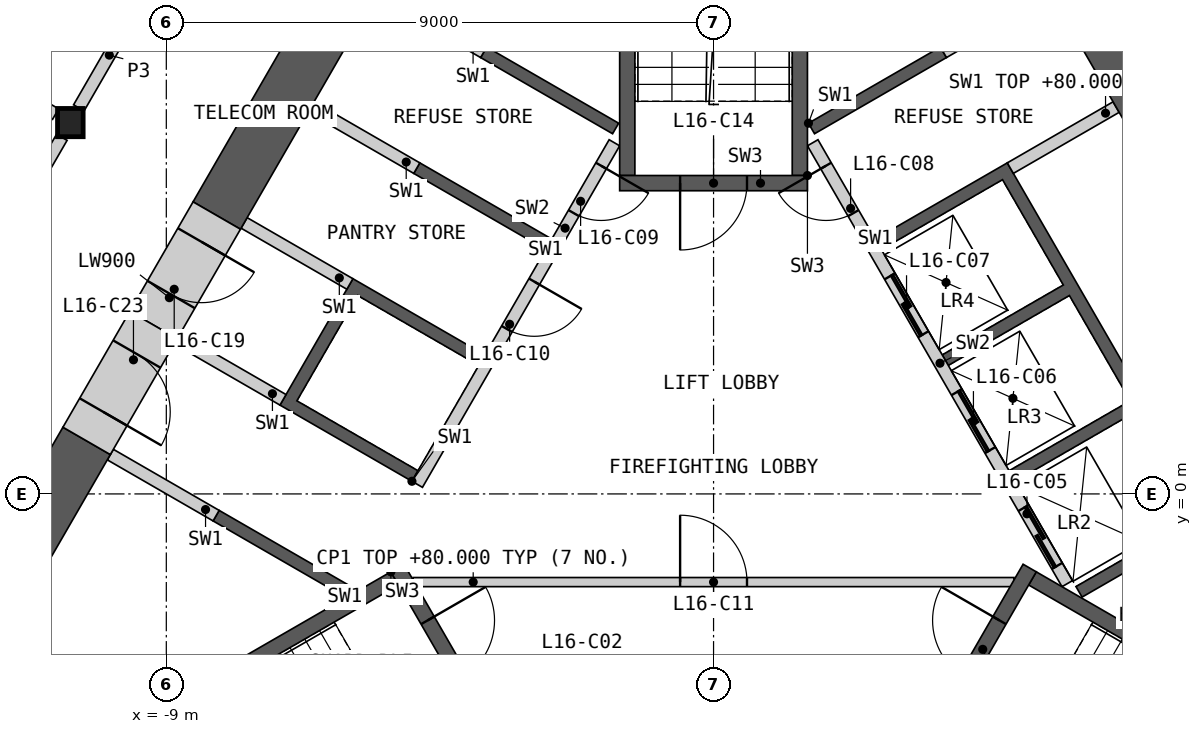
"""IFC4 building model, lengths in metres.
Left out: names, types, materials, properties, quantities, classifications, styles, units other than length and angle.
Written with IfcOpenShell. Run it as: python <this file> out.ifc"""

import sys

from ifc_helpers import new_model, si_unit, direction, frame, frame_2d, origin, origin_2d, place, context, subcontext, project, spatial, polyline, rectangle, i_section, outline, extrude, element, fill, save


model = new_model("IFC4")
c1 = context("Model", 3, precision=1e-05, world=origin(), true_north=direction((0.0, 1.0)))
c2 = subcontext(c1, "Body", "Model", "MODEL_VIEW")
j1 = project(units=[si_unit("LENGTHUNIT", "METRE"), si_unit("PLANEANGLEUNIT", "RADIAN")], contexts=[c1])
p1 = place(None, origin())
s1 = spatial("IfcSite", under=j1, at=p1, CompositionType="ELEMENT")
p2 = place(p1, origin())
s2 = spatial("IfcBuilding", under=s1, at=p2, CompositionType="ELEMENT")
p3 = place(p2, frame((0.0, 0.0, 76.2)))
s3 = spatial("IfcBuildingStorey", under=s2, at=p3, CompositionType="ELEMENT", Elevation=76.2)
p4 = place(p3, frame((-10.578, 6.107, 0.0), z_axis=(0.0, 0.0, 1.0), x_axis=(1.0, 0.0, 0.0)))
e1 = element("IfcColumn", 1, at=p4, inside=s3, PredefinedType="COLUMN", context=c2, shape_type="SweptSolid", body=[
    extrude(i_section(OverallWidth=0.421, OverallDepth=0.465, WebThickness=0.045, FlangeThickness=0.072, at=origin_2d()), origin(), (0.0, 0.0, 1.0), 4.2),
])
p5 = place(p3, origin())
e2 = element("IfcWall", 2, at=p5, inside=s3, PredefinedType="SHEAR", context=c2, shape_type="SweptSolid", body=[
    extrude(outline(polyline([(1.561, 6.097), (3.731, 7.35), (3.831, 7.177), (1.66, 5.924), (1.561, 6.097)])), origin(), (0.0, 0.0, 1.0), 3.8),
])
p6 = place(p3, origin())
e3 = element("IfcWall", 3, at=p6, inside=s3, PredefinedType="SHEAR", context=c2, shape_type="SweptSolid", body=[
    extrude(outline(polyline([(2.66, 4.192), (4.831, 5.445), (8.231, -0.444), (6.061, -1.697), (5.96, -1.524), (7.952, -0.374), (6.952, 1.358), (4.96, 0.208), (4.861, 0.381), (6.852, 1.531), (5.852, 3.263), (3.861, 2.113), (3.76, 2.287), (5.752, 3.437), (4.752, 5.169), (2.76, 4.019), (2.66, 4.192)])), origin(), (0.0, 0.0, 1.0), 3.8),
])
p7 = place(p3, frame((5.817, -1.476, 0.0), z_axis=(0.0, 0.0, 1.0), x_axis=(-0.500002616675, 0.866023893041, 0.0)))
e4 = element("IfcWall", 4, at=p7, inside=s3, PredefinedType="SOLIDWALL", context=c2, shape_type="SweptSolid", body=[
    extrude(rectangle(XDim=8.373, YDim=0.2, at=frame_2d((4.187, 0.0))), origin(), (0.0, 0.0, 1.0), 3.8),
])
p8 = place(p7, frame((0.337, 0.0, 0.0)))
e5 = element("IfcOpeningElement", 5, at=p8, cuts=e4, PredefinedType="OPENING", context=c2, shape_type="SweptSolid", body=[
    extrude(rectangle(XDim=1.1, YDim=2.1, at=frame_2d((0.55, 1.05))), frame((0.0, 0.11, 0.0), z_axis=(0.0, -1.0, 0.0), x_axis=(1.0, 0.0, 0.0)), (0.0, 0.0, 1.0), 0.22),
])
p9 = place(p7, frame((2.537, 0.0, 0.0)))
e6 = element("IfcOpeningElement", 6, at=p9, cuts=e4, PredefinedType="OPENING", context=c2, shape_type="SweptSolid", body=[
    extrude(rectangle(XDim=1.1, YDim=2.1, at=frame_2d((0.55, 1.05))), frame((0.0, 0.11, 0.0), z_axis=(0.0, -1.0, 0.0), x_axis=(1.0, 0.0, 0.0)), (0.0, 0.0, 1.0), 0.22),
])
p10 = place(p7, frame((4.737, 0.0, 0.0)))
e7 = element("IfcOpeningElement", 7, at=p10, cuts=e4, PredefinedType="OPENING", context=c2, shape_type="SweptSolid", body=[
    extrude(rectangle(XDim=1.1, YDim=2.1, at=frame_2d((0.55, 1.05))), frame((0.0, 0.11, 0.0), z_axis=(0.0, -1.0, 0.0), x_axis=(1.0, 0.0, 0.0)), (0.0, 0.0, 1.0), 0.22),
])
p11 = place(p7, frame((7.037, 0.0, 0.0)))
e8 = element("IfcOpeningElement", 8, at=p11, cuts=e4, PredefinedType="OPENING", context=c2, shape_type="SweptSolid", body=[
    extrude(rectangle(XDim=0.9, YDim=2.1, at=frame_2d((0.45, 1.05))), frame((0.0, 0.11, 0.0), z_axis=(0.0, -1.0, 0.0), x_axis=(1.0, 0.0, 0.0)), (0.0, 0.0, 1.0), 0.22),
])
p12 = place(p3, frame((4.881, 5.358, 0.0), z_axis=(0.0, 0.0, 1.0), x_axis=(0.866035824272, 0.499981950752, 0.0)))
e9 = element("IfcWall", 9, at=p12, inside=s3, PredefinedType="SHEAR", context=c2, shape_type="SweptSolid", body=[
    extrude(rectangle(XDim=2.009, YDim=0.2, at=frame_2d((1.004, 0.0))), origin(), (0.0, 0.0, 1.0), 3.8),
])
p13 = place(p3, frame((3.781, 7.263, 0.0), z_axis=(0.0, 0.0, 1.0), x_axis=(0.865983199114, 0.50007309351, 0.0)))
e10 = element("IfcWall", 10, at=p13, inside=s3, PredefinedType="SHEAR", context=c2, shape_type="SweptSolid", body=[
    extrude(rectangle(XDim=2.009, YDim=0.2, at=frame_2d((1.004, 0.0))), origin(), (0.0, 0.0, 1.0), 3.8),
])
p14 = place(p3, origin())
e11 = element("IfcWall", 11, at=p14, inside=s3, PredefinedType="SHEAR", context=c2, shape_type="SweptSolid", body=[
    extrude(outline(polyline([(-6.061, -1.697), (-8.231, -0.444), (-8.131, -0.271), (-5.96, -1.524), (-6.061, -1.697)])), origin(), (0.0, 0.0, 1.0), 3.8),
])
p15 = place(p3, origin())
e12 = element("IfcWall", 12, at=p15, inside=s3, PredefinedType="SHEAR", context=c2, shape_type="SweptSolid", body=[
    extrude(outline(polyline([(-4.96, 0.208), (-7.131, 1.461), (-5.931, 3.54), (-3.76, 2.287), (-3.861, 2.113), (-5.852, 3.263), (-6.852, 1.531), (-4.861, 0.381), (-4.96, 0.208)])), origin(), (0.0, 0.0, 1.0), 3.8),
])
p16 = place(p3, origin())
e13 = element("IfcWall", 13, at=p16, inside=s3, PredefinedType="SHEAR", context=c2, shape_type="SweptSolid", body=[
    extrude(outline(polyline([(-2.76, 4.019), (-4.931, 5.272), (-4.831, 5.445), (-2.66, 4.192), (-2.76, 4.019)])), origin(), (0.0, 0.0, 1.0), 3.8),
])
p17 = place(p3, origin())
e14 = element("IfcWall", 14, at=p17, inside=s3, PredefinedType="SHEAR", context=c2, shape_type="SweptSolid", body=[
    extrude(outline(polyline([(-3.731, 7.35), (-1.561, 6.097), (-1.66, 5.924), (-3.831, 7.177), (-3.731, 7.35)])), origin(), (0.0, 0.0, 1.0), 3.8),
])
p18 = place(p3, frame((-1.631, 5.776, 0.0), z_axis=(0.0, 0.0, 1.0), x_axis=(-0.499992876559, -0.866029516466, 0.0)))
e15 = element("IfcWall", 15, at=p18, inside=s3, PredefinedType="SOLIDWALL", context=c2, shape_type="SweptSolid", body=[
    extrude(rectangle(XDim=6.486, YDim=0.2, at=frame_2d((3.243, 0.0))), origin(), (0.0, 0.0, 1.0), 3.8),
])
p19 = place(p18, frame((0.437, 0.0, 0.0)))
e16 = element("IfcOpeningElement", 16, at=p19, cuts=e15, PredefinedType="OPENING", context=c2, shape_type="SweptSolid", body=[
    extrude(rectangle(XDim=0.9, YDim=2.1, at=frame_2d((0.45, 1.05))), frame((0.0, 0.11, 0.0), z_axis=(0.0, -1.0, 0.0), x_axis=(1.0, 0.0, 0.0)), (0.0, 0.0, 1.0), 0.22),
])
p20 = place(p18, frame((2.637, 0.0, 0.0)))
e17 = element("IfcOpeningElement", 17, at=p20, cuts=e15, PredefinedType="OPENING", context=c2, shape_type="SweptSolid", body=[
    extrude(rectangle(XDim=0.9, YDim=2.1, at=frame_2d((0.45, 1.05))), frame((0.0, 0.11, 0.0), z_axis=(0.0, -1.0, 0.0), x_axis=(1.0, 0.0, 0.0)), (0.0, 0.0, 1.0), 0.22),
])
p21 = place(p3, frame((-3.781, 7.263, 0.0), z_axis=(0.0, 0.0, 1.0), x_axis=(-0.865983199114, 0.50007309351, 0.0)))
e18 = element("IfcWall", 18, at=p21, inside=s3, PredefinedType="SHEAR", context=c2, shape_type="SweptSolid", body=[
    extrude(rectangle(XDim=2.009, YDim=0.2, at=frame_2d((1.004, 0.0))), origin(), (0.0, 0.0, 1.0), 3.8),
])
p22 = place(p3, frame((-4.881, 5.358, 0.0), z_axis=(0.0, 0.0, 1.0), x_axis=(-0.866035824272, 0.499981950752, 0.0)))
e19 = element("IfcWall", 19, at=p22, inside=s3, PredefinedType="SHEAR", context=c2, shape_type="SweptSolid", body=[
    extrude(rectangle(XDim=2.009, YDim=0.2, at=frame_2d((1.004, 0.0))), origin(), (0.0, 0.0, 1.0), 3.8),
])
p23 = place(p3, frame((-5.981, 3.453, 0.0), z_axis=(0.0, 0.0, 1.0), x_axis=(-0.866013584312, 0.500020471368, 0.0)))
e20 = element("IfcWall", 20, at=p23, inside=s3, PredefinedType="SHEAR", context=c2, shape_type="SweptSolid", body=[
    extrude(rectangle(XDim=2.009, YDim=0.2, at=frame_2d((1.005, 0.0))), origin(), (0.0, 0.0, 1.0), 3.8),
])
p24 = place(p3, frame((-7.081, 1.548, 0.0), z_axis=(0.0, 0.0, 1.0), x_axis=(-0.865983199114, 0.50007309351, 0.0)))
e21 = element("IfcWall", 21, at=p24, inside=s3, PredefinedType="SHEAR", context=c2, shape_type="SweptSolid", body=[
    extrude(rectangle(XDim=2.009, YDim=0.2, at=frame_2d((1.004, 0.0))), origin(), (0.0, 0.0, 1.0), 3.8),
])
p25 = place(p3, frame((-8.181, -0.357, 0.0), z_axis=(0.0, 0.0, 1.0), x_axis=(-0.866035824272, 0.499981950752, 0.0)))
e22 = element("IfcWall", 22, at=p25, inside=s3, PredefinedType="SHEAR", context=c2, shape_type="SweptSolid", body=[
    extrude(rectangle(XDim=2.009, YDim=0.2, at=frame_2d((1.004, 0.0))), origin(), (0.0, 0.0, 1.0), 3.8),
])
p26 = place(p3, frame((-4.941, -1.45, 0.0), z_axis=(0.0, 0.0, 1.0), x_axis=(1.0, 0.0, 0.0)))
e23 = element("IfcWall", 23, at=p26, inside=s3, PredefinedType="PARTITIONING", context=c2, shape_type="SweptSolid", body=[
    extrude(rectangle(XDim=9.882, YDim=0.15, at=frame_2d((4.941, 0.0))), origin(), (0.0, 0.0, 1.0), 3.8),
])
p27 = place(p26, frame((4.391, 0.0, 0.0)))
e24 = element("IfcOpeningElement", 24, at=p27, cuts=e23, PredefinedType="OPENING", context=c2, shape_type="SweptSolid", body=[
    extrude(rectangle(XDim=1.1, YDim=2.1, at=frame_2d((0.55, 1.05))), frame((0.0, 0.085, 0.0), z_axis=(0.0, -1.0, 0.0), x_axis=(1.0, 0.0, 0.0)), (0.0, 0.0, 1.0), 0.17),
])
p28 = place(p3, origin())
e25 = element("IfcWall", 25, at=p28, inside=s3, PredefinedType="SHEAR", context=c2, shape_type="SweptSolid", body=[
    extrude(outline(polyline([(-5.307, -1.281), (-10.374, -4.206), (-10.032, -4.298), (-5.182, -1.498), (-5.307, -1.281)])), origin(), (0.0, 0.0, 1.0), 3.8),
])
p29 = place(p3, frame((-5.199, -1.219, 0.0), z_axis=(0.0, 0.0, 1.0), x_axis=(0.499982516597, -0.866035497597, 0.0)))
e26 = element("IfcWall", 26, at=p29, inside=s3, PredefinedType="SHEAR", context=c2, shape_type="SweptSolid", body=[
    extrude(rectangle(XDim=3.088, YDim=0.25, at=frame_2d((1.544, 0.0))), origin(), (0.0, 0.0, 1.0), 3.8),
])
p30 = place(p29, frame((0.994, 0.0, 0.0)))
e27 = element("IfcOpeningElement", 27, at=p30, cuts=e26, PredefinedType="OPENING", context=c2, shape_type="SweptSolid", body=[
    extrude(rectangle(XDim=1.1, YDim=2.1, at=frame_2d((0.55, 1.05))), frame((0.0, 0.135, 0.0), z_axis=(0.0, -1.0, 0.0), x_axis=(1.0, 0.0, 0.0)), (0.0, 0.0, 1.0), 0.27),
])
p31 = place(p3, origin())
e28 = element("IfcWall", 28, at=p31, inside=s3, PredefinedType="SHEAR", context=c2, shape_type="SweptSolid", body=[
    extrude(outline(polyline([(10.032, -4.298), (10.374, -4.206), (5.307, -1.281), (5.182, -1.498), (10.032, -4.298)])), origin(), (0.0, 0.0, 1.0), 3.8),
])
p32 = place(p3, frame((3.655, -3.893, 0.0), z_axis=(0.0, 0.0, 1.0), x_axis=(0.499982516597, 0.866035497597, 0.0)))
e29 = element("IfcWall", 29, at=p32, inside=s3, PredefinedType="SHEAR", context=c2, shape_type="SweptSolid", body=[
    extrude(rectangle(XDim=3.088, YDim=0.25, at=frame_2d((1.544, 0.0))), origin(), (0.0, 0.0, 1.0), 3.8),
])
p33 = place(p32, frame((0.994, 0.0, 0.0)))
e30 = element("IfcOpeningElement", 30, at=p33, cuts=e29, PredefinedType="OPENING", context=c2, shape_type="SweptSolid", body=[
    extrude(rectangle(XDim=1.1, YDim=2.1, at=frame_2d((0.55, 1.05))), frame((0.0, 0.135, 0.0), z_axis=(0.0, -1.0, 0.0), x_axis=(1.0, 0.0, 0.0)), (0.0, 0.0, 1.0), 0.27),
])
p34 = place(p3, origin())
e31 = element("IfcWall", 31, at=p34, inside=s3, PredefinedType="SHEAR", context=c2, shape_type="SweptSolid", body=[
    extrude(outline(polyline([(1.544, 5.237), (1.544, 11.087), (1.294, 10.837), (1.294, 5.237), (1.544, 5.237)])), origin(), (0.0, 0.0, 1.0), 3.8),
])
p35 = place(p3, origin())
e32 = element("IfcWall", 32, at=p35, inside=s3, PredefinedType="SHEAR", context=c2, shape_type="SweptSolid", body=[
    extrude(outline(polyline([(-1.294, 10.837), (-1.544, 11.087), (-1.544, 5.237), (-1.294, 5.237), (-1.294, 10.837)])), origin(), (0.0, 0.0, 1.0), 3.8),
])
p36 = place(p3, frame((1.544, 5.112, 0.0), z_axis=(0.0, 0.0, 1.0), x_axis=(-1.0, 0.0, 0.0)))
e33 = element("IfcWall", 33, at=p36, inside=s3, PredefinedType="SHEAR", context=c2, shape_type="SweptSolid", body=[
    extrude(rectangle(XDim=3.088, YDim=0.25, at=frame_2d((1.544, 0.0))), origin(), (0.0, 0.0, 1.0), 3.8),
])
p37 = place(p36, frame((0.994, 0.0, 0.0)))
e34 = element("IfcOpeningElement", 34, at=p37, cuts=e33, PredefinedType="OPENING", context=c2, shape_type="SweptSolid", body=[
    extrude(rectangle(XDim=1.1, YDim=2.1, at=frame_2d((0.55, 1.05))), frame((0.0, 0.135, 0.0), z_axis=(0.0, -1.0, 0.0), x_axis=(1.0, 0.0, 0.0)), (0.0, 0.0, 1.0), 0.27),
])
p38 = place(p3, frame((7.646, 5.486, 0.0), z_axis=(0.0, 0.0, 1.0), x_axis=(-0.499982660725, 0.866035414388, 0.0)))
e35 = element("IfcWall", 35, at=p38, inside=s3, PredefinedType="SHEAR", context=c2, shape_type="SweptSolid", body=[
    extrude(rectangle(XDim=10.206, YDim=0.9, at=frame_2d((5.103, 0.0))), origin(), (0.0, 0.0, 1.0), 3.8),
])
p39 = place(p3, frame((-10.31, 0.872, 0.0), z_axis=(0.0, 0.0, 1.0), x_axis=(-0.499991697393, -0.866030197244, 0.0)))
e36 = element("IfcWall", 36, at=p39, inside=s3, PredefinedType="SHEAR", context=c2, shape_type="SweptSolid", body=[
    extrude(rectangle(XDim=11.041, YDim=0.9, at=frame_2d((5.521, 0.0))), origin(), (0.0, 0.0, 1.0), 3.8),
])
p40 = place(p3, frame((-4.514, 10.911, 0.0), z_axis=(0.0, 0.0, 1.0), x_axis=(-0.500006662879, -0.866021556935, 0.0)))
e37 = element("IfcWall", 37, at=p40, inside=s3, PredefinedType="SHEAR", context=c2, shape_type="SweptSolid", body=[
    extrude(rectangle(XDim=7.312, YDim=0.9, at=frame_2d((3.656, 0.0))), origin(), (0.0, 0.0, 1.0), 3.8),
])
p41 = place(p3, frame((-8.17, 4.579, 0.0), z_axis=(0.0, 0.0, 1.0), x_axis=(-0.499888406853, -0.866089822532, 0.0)))
e38 = element("IfcWall", 38, at=p41, inside=s3, PredefinedType="SHEAR", context=c2, shape_type="SweptSolid", body=[
    extrude(rectangle(XDim=2.08, YDim=0.9, at=frame_2d((1.04, 0.0))), origin(), (0.0, 0.0, 1.0), 3.8),
])
p42 = place(p41, frame((0.5, 0.0, 0.0)))
e39 = element("IfcOpeningElement", 39, at=p42, cuts=e38, PredefinedType="OPENING", context=c2, shape_type="SweptSolid", body=[
    extrude(rectangle(XDim=1.0, YDim=2.1, at=frame_2d((0.5, 1.05))), frame((0.0, 0.46, 0.0), z_axis=(0.0, -1.0, 0.0), x_axis=(1.0, 0.0, 0.0)), (0.0, 0.0, 1.0), 0.92),
])
p43 = place(p3, frame((-9.21, 2.777, 0.0), z_axis=(0.0, 0.0, 1.0), x_axis=(-0.500077893725, -0.86598042715, 0.0)))
e40 = element("IfcWall", 40, at=p43, inside=s3, PredefinedType="SHEAR", context=c2, shape_type="SweptSolid", body=[
    extrude(rectangle(XDim=2.2, YDim=0.9, at=frame_2d((1.1, 0.0))), origin(), (0.0, 0.0, 1.0), 3.8),
])
p44 = place(p43, frame((0.55, 0.0, 0.0)))
e41 = element("IfcOpeningElement", 41, at=p44, cuts=e40, PredefinedType="OPENING", context=c2, shape_type="SweptSolid", body=[
    extrude(rectangle(XDim=1.1, YDim=2.1, at=frame_2d((0.55, 1.05))), frame((0.0, 0.46, 0.0), z_axis=(0.0, -1.0, 0.0), x_axis=(1.0, 0.0, 0.0)), (0.0, 0.0, 1.0), 0.92),
])
p45 = place(p3, frame((-15.728, -2.811, 0.0), z_axis=(0.0, 0.0, 1.0), x_axis=(0.49999175339, 0.866030164915, 0.0)))
e42 = element("IfcWall", 42, at=p45, inside=s3, PredefinedType="PARTITIONING", context=c2, shape_type="SweptSolid", body=[
    extrude(rectangle(XDim=10.019, YDim=0.2, at=frame_2d((5.009, 0.0))), origin(), (0.0, 0.0, 1.0), 3.8),
])
p46 = place(p45, frame((4.76, 0.0, 0.0)))
e43 = element("IfcOpeningElement", 43, at=p46, cuts=e42, PredefinedType="OPENING", context=c2, shape_type="SweptSolid", body=[
    extrude(rectangle(XDim=1.0, YDim=2.1, at=frame_2d((0.5, 1.05))), frame((0.0, 0.11, 0.0), z_axis=(0.0, -1.0, 0.0), x_axis=(1.0, 0.0, 0.0)), (0.0, 0.0, 1.0), 0.22),
])
p47 = place(p3, frame((5.429, 15.026, 0.0), z_axis=(0.0, 0.0, 1.0), x_axis=(0.50001002959, -0.86601961312, 0.0)))
e44 = element("IfcWall", 44, at=p47, inside=s3, PredefinedType="PARTITIONING", context=c2, shape_type="SweptSolid", body=[
    extrude(rectangle(XDim=10.019, YDim=0.2, at=frame_2d((5.009, 0.0))), origin(), (0.0, 0.0, 1.0), 3.8),
])
p48 = place(p47, frame((4.76, 0.0, 0.0)))
e45 = element("IfcOpeningElement", 45, at=p48, cuts=e44, PredefinedType="OPENING", context=c2, shape_type="SweptSolid", body=[
    extrude(rectangle(XDim=1.0, YDim=2.1, at=frame_2d((0.5, 1.05))), frame((0.0, 0.11, 0.0), z_axis=(0.0, -1.0, 0.0), x_axis=(1.0, 0.0, 0.0)), (0.0, 0.0, 1.0), 0.22),
])
p49 = place(p3, frame((-10.439, 6.35, 0.0), z_axis=(0.0, 0.0, 1.0), x_axis=(0.50001002959, 0.86601961312, 0.0)))
e46 = element("IfcWall", 46, at=p49, inside=s3, PredefinedType="PARTITIONING", context=c2, shape_type="SweptSolid", body=[
    extrude(rectangle(XDim=10.019, YDim=0.2, at=frame_2d((5.009, 0.0))), origin(), (0.0, 0.0, 1.0), 3.8),
])
p50 = place(p49, frame((6.664, 0.0, 0.0)))
e47 = element("IfcOpeningElement", 47, at=p50, cuts=e46, PredefinedType="OPENING", context=c2, shape_type="SweptSolid", body=[
    extrude(rectangle(XDim=1.0, YDim=2.1, at=frame_2d((0.5, 1.05))), frame((0.0, 0.11, 0.0), z_axis=(0.0, -1.0, 0.0), x_axis=(1.0, 0.0, 0.0)), (0.0, 0.0, 1.0), 0.22),
])
p51 = place(p49, frame((1.854, 0.0, 0.0)))
e48 = element("IfcOpeningElement", 48, at=p51, cuts=e46, PredefinedType="OPENING", context=c2, shape_type="SweptSolid", body=[
    extrude(rectangle(XDim=1.0, YDim=2.1, at=frame_2d((0.5, 1.05))), frame((0.0, 0.11, 0.0), z_axis=(0.0, -1.0, 0.0), x_axis=(1.0, 0.0, 0.0)), (0.0, 0.0, 1.0), 0.22),
])
p52 = place(p3, frame((-21.947, 12.671, 0.0), z_axis=(0.0, 0.0, 1.0), x_axis=(0.866026729935, -0.499997703033, 0.0)))
e49 = element("IfcWall", 49, at=p52, inside=s3, PredefinedType="PARTITIONING", context=c2, shape_type="SweptSolid", body=[
    extrude(rectangle(XDim=12.848, YDim=0.2, at=frame_2d((6.424, 0.0))), origin(), (0.0, 0.0, 1.0), 2.885),
])
p53 = place(p8, origin())
e50 = element("IfcDoor", 50, at=p53, inside=s3, OperationType="SLIDING_TO_LEFT", PredefinedType="DOOR", context=c2, shape_type="SweptSolid", body=[
    extrude(rectangle(XDim=1.1, YDim=2.1, at=frame_2d((0.55, 1.05))), frame((0.0, 0.025, 0.0), z_axis=(0.0, -1.0, 0.0), x_axis=(1.0, 0.0, 0.0)), (0.0, 0.0, 1.0), 0.05),
])
fill(e5, e50)
p54 = place(p9, origin())
e51 = element("IfcDoor", 51, at=p54, inside=s3, OperationType="SLIDING_TO_LEFT", PredefinedType="DOOR", context=c2, shape_type="SweptSolid", body=[
    extrude(rectangle(XDim=1.1, YDim=2.1, at=frame_2d((0.55, 1.05))), frame((0.0, 0.025, 0.0), z_axis=(0.0, -1.0, 0.0), x_axis=(1.0, 0.0, 0.0)), (0.0, 0.0, 1.0), 0.05),
])
fill(e6, e51)
p55 = place(p10, origin())
e52 = element("IfcDoor", 52, at=p55, inside=s3, OperationType="SLIDING_TO_LEFT", PredefinedType="DOOR", context=c2, shape_type="SweptSolid", body=[
    extrude(rectangle(XDim=1.1, YDim=2.1, at=frame_2d((0.55, 1.05))), frame((0.0, 0.025, 0.0), z_axis=(0.0, -1.0, 0.0), x_axis=(1.0, 0.0, 0.0)), (0.0, 0.0, 1.0), 0.05),
])
fill(e7, e52)
p56 = place(p11, origin())
e53 = element("IfcDoor", 53, at=p56, inside=s3, OperationType="SINGLE_SWING_RIGHT", PredefinedType="DOOR", context=c2, shape_type="SweptSolid", body=[
    extrude(rectangle(XDim=0.9, YDim=2.1, at=frame_2d((0.45, 1.05))), frame((0.0, 0.025, 0.0), z_axis=(0.0, -1.0, 0.0), x_axis=(1.0, 0.0, 0.0)), (0.0, 0.0, 1.0), 0.05),
])
fill(e8, e53)
p57 = place(p19, origin())
e54 = element("IfcDoor", 54, at=p57, inside=s3, OperationType="SINGLE_SWING_LEFT", PredefinedType="DOOR", context=c2, shape_type="SweptSolid", body=[
    extrude(rectangle(XDim=0.9, YDim=2.1, at=frame_2d((0.45, 1.05))), frame((0.0, 0.025, 0.0), z_axis=(0.0, -1.0, 0.0), x_axis=(1.0, 0.0, 0.0)), (0.0, 0.0, 1.0), 0.05),
])
fill(e16, e54)
p58 = place(p20, origin())
e55 = element("IfcDoor", 55, at=p58, inside=s3, OperationType="SINGLE_SWING_LEFT", PredefinedType="DOOR", context=c2, shape_type="SweptSolid", body=[
    extrude(rectangle(XDim=0.9, YDim=2.1, at=frame_2d((0.45, 1.05))), frame((0.0, 0.025, 0.0), z_axis=(0.0, -1.0, 0.0), x_axis=(1.0, 0.0, 0.0)), (0.0, 0.0, 1.0), 0.05),
])
fill(e17, e55)
p59 = place(p27, origin())
e56 = element("IfcDoor", 56, at=p59, inside=s3, OperationType="SINGLE_SWING_LEFT", PredefinedType="DOOR", context=c2, shape_type="SweptSolid", body=[
    extrude(rectangle(XDim=1.1, YDim=2.1, at=frame_2d((0.55, 1.05))), frame((0.0, 0.025, 0.0), z_axis=(0.0, -1.0, 0.0), x_axis=(1.0, 0.0, 0.0)), (0.0, 0.0, 1.0), 0.05),
])
fill(e24, e56)
p60 = place(p30, origin())
e57 = element("IfcDoor", 57, at=p60, inside=s3, OperationType="SINGLE_SWING_LEFT", PredefinedType="DOOR", context=c2, shape_type="SweptSolid", body=[
    extrude(rectangle(XDim=1.1, YDim=2.1, at=frame_2d((0.55, 1.05))), frame((0.0, 0.025, 0.0), z_axis=(0.0, -1.0, 0.0), x_axis=(1.0, 0.0, 0.0)), (0.0, 0.0, 1.0), 0.05),
])
fill(e27, e57)
p61 = place(p33, origin())
e58 = element("IfcDoor", 58, at=p61, inside=s3, OperationType="SINGLE_SWING_RIGHT", PredefinedType="DOOR", context=c2, shape_type="SweptSolid", body=[
    extrude(rectangle(XDim=1.1, YDim=2.1, at=frame_2d((0.55, 1.05))), frame((0.0, 0.025, 0.0), z_axis=(0.0, -1.0, 0.0), x_axis=(1.0, 0.0, 0.0)), (0.0, 0.0, 1.0), 0.05),
])
fill(e30, e58)
p62 = place(p37, origin())
e59 = element("IfcDoor", 59, at=p62, inside=s3, OperationType="SINGLE_SWING_RIGHT", PredefinedType="DOOR", context=c2, shape_type="SweptSolid", body=[
    extrude(rectangle(XDim=1.1, YDim=2.1, at=frame_2d((0.55, 1.05))), frame((0.0, 0.025, 0.0), z_axis=(0.0, -1.0, 0.0), x_axis=(1.0, 0.0, 0.0)), (0.0, 0.0, 1.0), 0.05),
])
fill(e34, e59)
p63 = place(p42, origin())
e60 = element("IfcDoor", 60, at=p63, inside=s3, OperationType="SINGLE_SWING_LEFT", PredefinedType="DOOR", context=c2, shape_type="SweptSolid", body=[
    extrude(rectangle(XDim=1.0, YDim=2.1, at=frame_2d((0.5, 1.05))), frame((0.0, 0.205, 0.0), z_axis=(0.0, -1.0, 0.0), x_axis=(1.0, 0.0, 0.0)), (0.0, 0.0, 1.0), 0.05),
])
fill(e39, e60)
p64 = place(p44, origin())
e61 = element("IfcDoor", 61, at=p64, inside=s3, OperationType="SINGLE_SWING_RIGHT", PredefinedType="DOOR", context=c2, shape_type="SweptSolid", body=[
    extrude(rectangle(XDim=1.1, YDim=2.1, at=frame_2d((0.55, 1.05))), frame((0.0, 0.205, 0.0), z_axis=(0.0, -1.0, 0.0), x_axis=(1.0, 0.0, 0.0)), (0.0, 0.0, 1.0), 0.05),
])
fill(e41, e61)
save(model, sys.argv[1])
